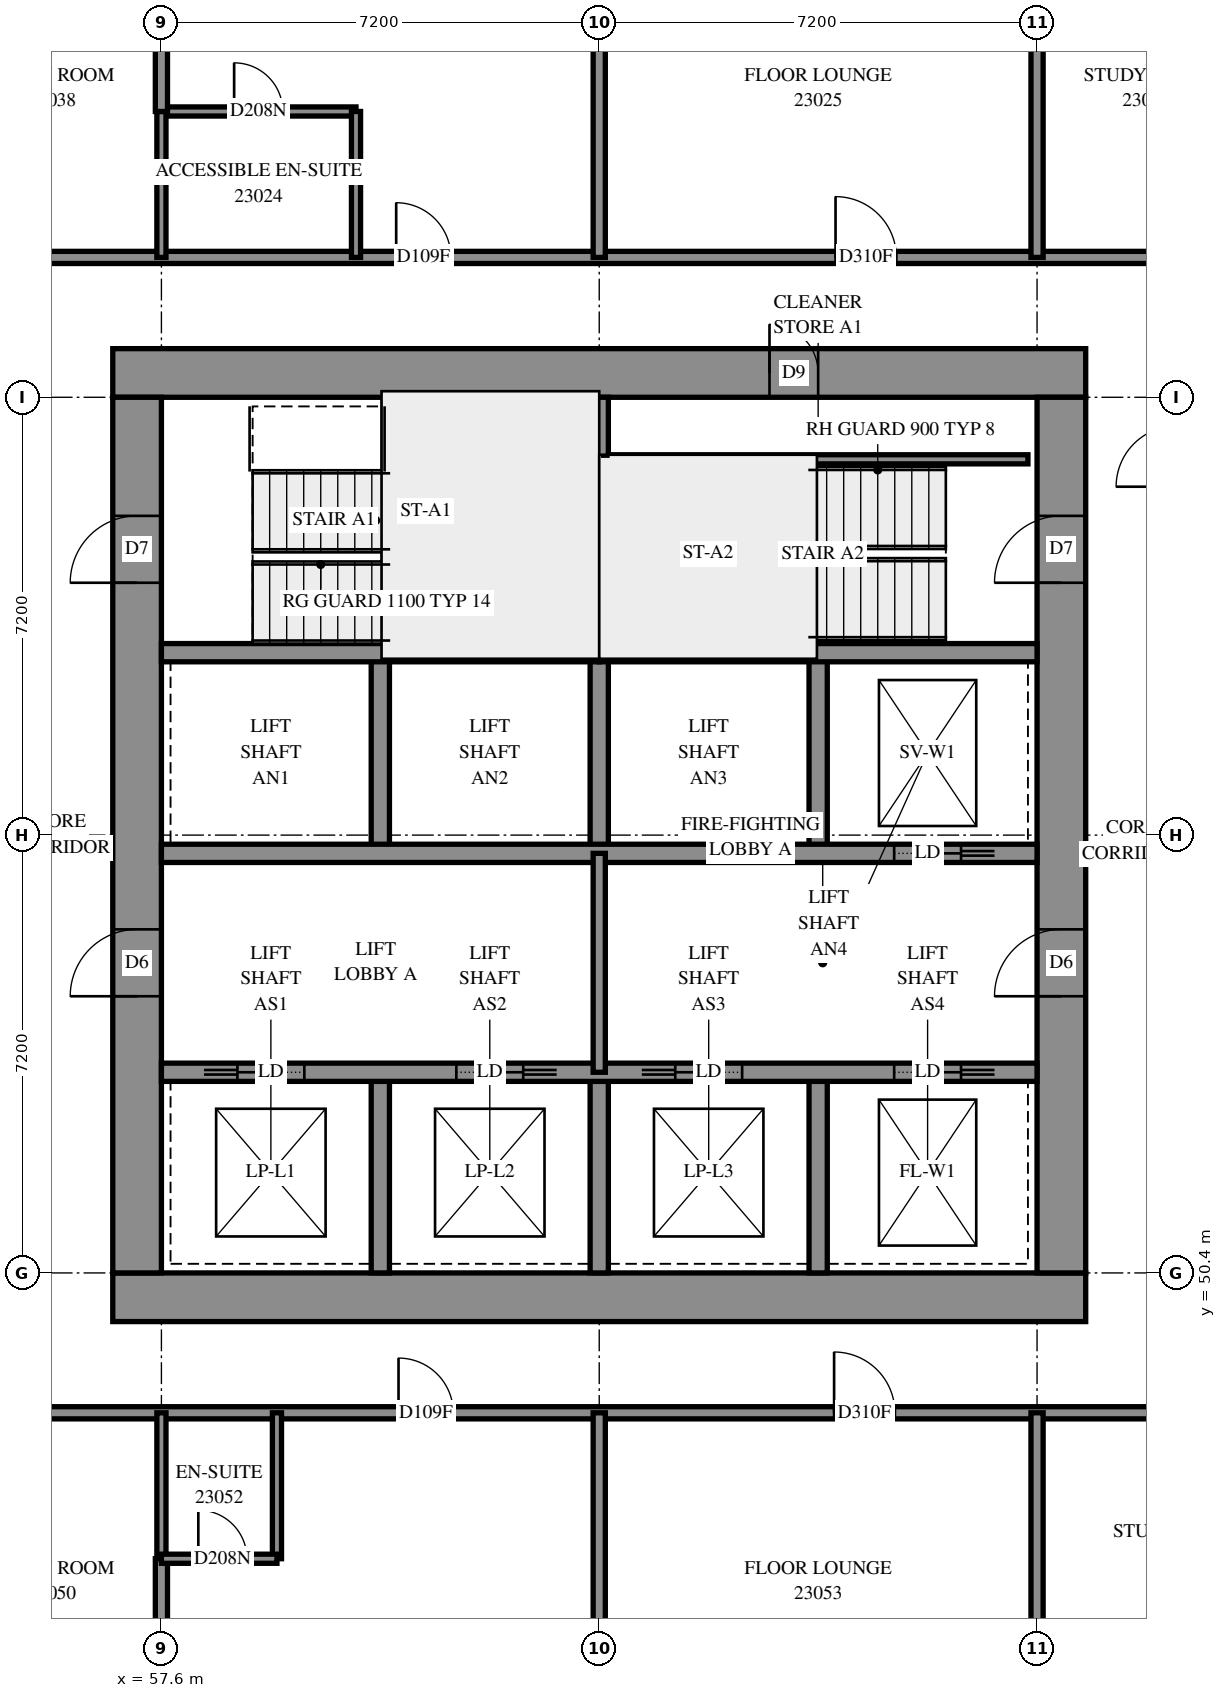
"""IFC4 building model, lengths in metres.
Left out: names, types, materials, properties, quantities, classifications, styles, units other than length and angle.
Written with IfcOpenShell. Run it as: python <this file> out.ifc"""

import sys

from ifc_helpers import new_model, si_unit, direction, frame, frame_2d, origin, place, context, subcontext, project, spatial, rectangle, extrude, element, fill, save


model = new_model("IFC4")
c1 = context("Model", 3, precision=1e-05, world=origin(), true_north=direction((0.0, 1.0)))
c2 = subcontext(c1, "Body", "Model", "MODEL_VIEW")
j1 = project(units=[si_unit("LENGTHUNIT", "METRE"), si_unit("PLANEANGLEUNIT", "RADIAN")], contexts=[c1])
p1 = place(None, origin())
s1 = spatial("IfcSite", under=j1, at=p1, CompositionType="ELEMENT")
p2 = place(p1, origin())
s2 = spatial("IfcBuilding", under=s1, at=p2, CompositionType="ELEMENT")
p3 = place(p2, frame((0.0, 0.0, 88.0)))
s3 = spatial("IfcBuildingStorey", under=s2, at=p3, CompositionType="ELEMENT", Elevation=88.0)
p4 = place(p3, frame((56.8, 50.0, -0.3), z_axis=(0.0, 0.0, 1.0), x_axis=(1.0, 0.0, 0.0)))
e1 = element("IfcWall", 1, at=p4, inside=s3, PredefinedType="SHEAR", context=c2, shape_type="SweptSolid", body=[
    extrude(rectangle(XDim=16.0, YDim=0.8, at=frame_2d((8.0, 0.0))), origin(), (0.0, 0.0, 1.0), 2.7),
])
p5 = place(p3, frame((56.8, 65.2, -0.3), z_axis=(0.0, 0.0, 1.0), x_axis=(1.0, 0.0, 0.0)))
e2 = element("IfcWall", 2, at=p5, inside=s3, PredefinedType="SHEAR", context=c2, shape_type="SweptSolid", body=[
    extrude(rectangle(XDim=16.0, YDim=0.8, at=frame_2d((8.0, 0.0))), origin(), (0.0, 0.0, 1.0), 2.7),
])
p6 = place(p5, frame((10.8, 0.0, 0.3)))
e3 = element("IfcOpeningElement", 3, at=p6, cuts=e2, PredefinedType="OPENING", context=c2, shape_type="SweptSolid", body=[
    extrude(rectangle(XDim=0.8, YDim=2.1, at=frame_2d((0.4, 1.05))), frame((0.0, 0.41, 0.0), z_axis=(0.0, -1.0, 0.0), x_axis=(1.0, 0.0, 0.0)), (0.0, 0.0, 1.0), 0.82),
])
p7 = place(p3, frame((57.2, 50.4, -0.3), z_axis=(0.0, 0.0, 1.0), x_axis=(0.0, 1.0, 0.0)))
e4 = element("IfcWall", 4, at=p7, inside=s3, PredefinedType="SHEAR", context=c2, shape_type="SweptSolid", body=[
    extrude(rectangle(XDim=14.4, YDim=0.8, at=frame_2d((7.2, 0.0))), origin(), (0.0, 0.0, 1.0), 2.7),
])
p8 = place(p7, frame((4.55, 0.0, 0.3)))
e5 = element("IfcOpeningElement", 5, at=p8, cuts=e4, PredefinedType="OPENING", context=c2, shape_type="SweptSolid", body=[
    extrude(rectangle(XDim=1.1, YDim=2.1, at=frame_2d((0.55, 1.05))), frame((0.0, 0.41, 0.0), z_axis=(0.0, -1.0, 0.0), x_axis=(1.0, 0.0, 0.0)), (0.0, 0.0, 1.0), 0.82),
])
p9 = place(p7, frame((11.35, 0.0, 0.3)))
e6 = element("IfcOpeningElement", 6, at=p9, cuts=e4, PredefinedType="OPENING", context=c2, shape_type="SweptSolid", body=[
    extrude(rectangle(XDim=1.1, YDim=2.1, at=frame_2d((0.55, 1.05))), frame((0.0, 0.41, 0.0), z_axis=(0.0, -1.0, 0.0), x_axis=(1.0, 0.0, 0.0)), (0.0, 0.0, 1.0), 0.82),
])
p10 = place(p3, frame((72.4, 50.4, -0.3), z_axis=(0.0, 0.0, 1.0), x_axis=(0.0, 1.0, 0.0)))
e7 = element("IfcWall", 7, at=p10, inside=s3, PredefinedType="SHEAR", context=c2, shape_type="SweptSolid", body=[
    extrude(rectangle(XDim=14.4, YDim=0.8, at=frame_2d((7.2, 0.0))), origin(), (0.0, 0.0, 1.0), 2.7),
])
p11 = place(p10, frame((4.55, 0.0, 0.3)))
e8 = element("IfcOpeningElement", 8, at=p11, cuts=e7, PredefinedType="OPENING", context=c2, shape_type="SweptSolid", body=[
    extrude(rectangle(XDim=1.1, YDim=2.1, at=frame_2d((0.55, 1.05))), frame((0.0, 0.41, 0.0), z_axis=(0.0, -1.0, 0.0), x_axis=(1.0, 0.0, 0.0)), (0.0, 0.0, 1.0), 0.82),
])
p12 = place(p10, frame((11.35, 0.0, 0.3)))
e9 = element("IfcOpeningElement", 9, at=p12, cuts=e7, PredefinedType="OPENING", context=c2, shape_type="SweptSolid", body=[
    extrude(rectangle(XDim=1.1, YDim=2.1, at=frame_2d((0.55, 1.05))), frame((0.0, 0.41, 0.0), z_axis=(0.0, -1.0, 0.0), x_axis=(1.0, 0.0, 0.0)), (0.0, 0.0, 1.0), 0.82),
])
for number, where, z_axis, x_axis in (
    (10, (61.2, 50.4, 0.0), (0.0, 0.0, 1.0), (0.0, 1.0, 0.0)),
    (11, (61.2, 57.3, 0.0), (0.0, 0.0, 1.0), (0.0, 1.0, 0.0)),
    (12, (64.8, 50.4, 0.0), (0.0, 0.0, 1.0), (0.0, 1.0, 0.0)),
    (13, (64.8, 57.3, 0.0), (0.0, 0.0, 1.0), (0.0, 1.0, 0.0)),
    (14, (68.4, 50.4, 0.0), (0.0, 0.0, 1.0), (0.0, 1.0, 0.0)),
    (15, (68.4, 57.3, 0.0), (0.0, 0.0, 1.0), (0.0, 1.0, 0.0)),
):
    element("IfcWall", number, at=place(p3, frame(where, z_axis=z_axis, x_axis=x_axis)), inside=s3, PredefinedType="SOLIDWALL", context=c2, shape_type="SweptSolid", body=[
        extrude(rectangle(XDim=3.3, YDim=0.3, at=frame_2d((1.65, 0.0))), origin(), (0.0, 0.0, 1.0), 3.1),
    ])
p13 = place(p3, frame((57.6, 53.7, 0.0), z_axis=(0.0, 0.0, 1.0), x_axis=(1.0, 0.0, 0.0)))
e16 = element("IfcWall", 16, at=p13, inside=s3, PredefinedType="SOLIDWALL", context=c2, shape_type="SweptSolid", body=[
    extrude(rectangle(XDim=14.4, YDim=0.3, at=frame_2d((7.2, 0.0))), origin(), (0.0, 0.0, 1.0), 3.1),
])
p14 = place(p13, frame((1.25, 0.0, 0.0)))
e17 = element("IfcOpeningElement", 17, at=p14, cuts=e16, PredefinedType="OPENING", context=c2, shape_type="SweptSolid", body=[
    extrude(rectangle(XDim=1.1, YDim=2.1, at=frame_2d((0.55, 1.05))), frame((0.0, 0.16, 0.0), z_axis=(0.0, -1.0, 0.0), x_axis=(1.0, 0.0, 0.0)), (0.0, 0.0, 1.0), 0.32),
])
p15 = place(p13, frame((4.85, 0.0, 0.0)))
e18 = element("IfcOpeningElement", 18, at=p15, cuts=e16, PredefinedType="OPENING", context=c2, shape_type="SweptSolid", body=[
    extrude(rectangle(XDim=1.1, YDim=2.1, at=frame_2d((0.55, 1.05))), frame((0.0, 0.16, 0.0), z_axis=(0.0, -1.0, 0.0), x_axis=(1.0, 0.0, 0.0)), (0.0, 0.0, 1.0), 0.32),
])
p16 = place(p13, frame((8.45, 0.0, 0.0)))
e19 = element("IfcOpeningElement", 19, at=p16, cuts=e16, PredefinedType="OPENING", context=c2, shape_type="SweptSolid", body=[
    extrude(rectangle(XDim=1.1, YDim=2.1, at=frame_2d((0.55, 1.05))), frame((0.0, 0.16, 0.0), z_axis=(0.0, -1.0, 0.0), x_axis=(1.0, 0.0, 0.0)), (0.0, 0.0, 1.0), 0.32),
])
p17 = place(p13, frame((12.05, 0.0, 0.0)))
e20 = element("IfcOpeningElement", 20, at=p17, cuts=e16, PredefinedType="OPENING", context=c2, shape_type="SweptSolid", body=[
    extrude(rectangle(XDim=1.1, YDim=2.1, at=frame_2d((0.55, 1.05))), frame((0.0, 0.16, 0.0), z_axis=(0.0, -1.0, 0.0), x_axis=(1.0, 0.0, 0.0)), (0.0, 0.0, 1.0), 0.32),
])
p18 = place(p3, frame((57.6, 57.3, 0.0), z_axis=(0.0, 0.0, 1.0), x_axis=(1.0, 0.0, 0.0)))
e21 = element("IfcWall", 21, at=p18, inside=s3, PredefinedType="SOLIDWALL", context=c2, shape_type="SweptSolid", body=[
    extrude(rectangle(XDim=14.4, YDim=0.3, at=frame_2d((7.2, 0.0))), origin(), (0.0, 0.0, 1.0), 3.1),
])
p19 = place(p18, frame((12.05, 0.0, 0.0)))
e22 = element("IfcOpeningElement", 22, at=p19, cuts=e21, PredefinedType="OPENING", context=c2, shape_type="SweptSolid", body=[
    extrude(rectangle(XDim=1.1, YDim=2.1, at=frame_2d((0.55, 1.05))), frame((0.0, 0.16, 0.0), z_axis=(0.0, -1.0, 0.0), x_axis=(1.0, 0.0, 0.0)), (0.0, 0.0, 1.0), 0.32),
])
for number, where, z_axis, x_axis in (
    (23, (57.6, 60.6, 0.0), (0.0, 0.0, 1.0), (1.0, 0.0, 0.0)),
    (24, (64.8, 60.6, 0.0), (0.0, 0.0, 1.0), (1.0, 0.0, 0.0)),
):
    element("IfcWall", number, at=place(p3, frame(where, z_axis=z_axis, x_axis=x_axis)), inside=s3, PredefinedType="SOLIDWALL", context=c2, shape_type="SweptSolid", body=[
        extrude(rectangle(XDim=7.2, YDim=0.3, at=frame_2d((3.6, 0.0))), origin(), (0.0, 0.0, 1.0), 3.1),
    ])
p20 = place(p3, frame((64.8, 60.6, 0.0), z_axis=(0.0, 0.0, 1.0), x_axis=(0.0, 1.0, 0.0)))
e25 = element("IfcWall", 25, at=p20, inside=s3, PredefinedType="SOLIDWALL", context=c2, shape_type="SweptSolid", body=[
    extrude(rectangle(XDim=4.2, YDim=0.3, at=frame_2d((2.1, 0.0))), origin(), (0.0, 0.0, 1.0), 3.1),
])
p21 = place(p3, frame((64.95, 63.78, 0.0), z_axis=(0.0, 0.0, 1.0), x_axis=(1.0, 0.0, 0.0)))
e26 = element("IfcWall", 26, at=p21, inside=s3, PredefinedType="PARTITIONING", context=c2, shape_type="SweptSolid", body=[
    extrude(rectangle(XDim=6.9, YDim=0.15, at=frame_2d((3.45, 0.0))), origin(), (0.0, 0.0, 1.0), 3.1),
])
p22 = place(p3, frame((64.8, 53.7, 0.0), z_axis=(0.0, 0.0, 1.0), x_axis=(0.0, 1.0, 0.0)))
e27 = element("IfcWall", 27, at=p22, inside=s3, PredefinedType="PARTITIONING", context=c2, shape_type="SweptSolid", body=[
    extrude(rectangle(XDim=3.6, YDim=0.2, at=frame_2d((1.8, 0.0))), origin(), (0.0, 0.0, 1.0), 3.1),
])
p23 = place(p3, frame((55.3, 48.1, 0.0), z_axis=(0.0, 0.0, 1.0), x_axis=(1.0, 0.0, 0.0)))
e28 = element("IfcWall", 28, at=p23, inside=s3, PredefinedType="PARTITIONING", context=c2, shape_type="SweptSolid", body=[
    extrude(rectangle(XDim=19.092, YDim=0.2, at=frame_2d((9.546, 0.0))), origin(), (0.0, 0.0, 1.0), 3.1),
])
p24 = place(p23, frame((6.199, 0.0, 0.0)))
e29 = element("IfcOpeningElement", 29, at=p24, cuts=e28, PredefinedType="OPENING", context=c2, shape_type="SweptSolid", body=[
    extrude(rectangle(XDim=0.9, YDim=2.1, at=frame_2d((0.45, 1.05))), frame((0.0, 0.11, 0.0), z_axis=(0.0, -1.0, 0.0), x_axis=(1.0, 0.0, 0.0)), (0.0, 0.0, 1.0), 0.22),
])
p25 = place(p23, frame((13.363, 0.0, 0.0)))
e30 = element("IfcOpeningElement", 30, at=p25, cuts=e28, PredefinedType="OPENING", context=c2, shape_type="SweptSolid", body=[
    extrude(rectangle(XDim=1.0, YDim=2.1, at=frame_2d((0.5, 1.05))), frame((0.0, 0.11, 0.0), z_axis=(0.0, -1.0, 0.0), x_axis=(1.0, 0.0, 0.0)), (0.0, 0.0, 1.0), 0.22),
])
p26 = place(p3, frame((55.3, 67.1, 0.0), z_axis=(0.0, 0.0, 1.0), x_axis=(1.0, 0.0, 0.0)))
e31 = element("IfcWall", 31, at=p26, inside=s3, PredefinedType="PARTITIONING", context=c2, shape_type="SweptSolid", body=[
    extrude(rectangle(XDim=19.0, YDim=0.2, at=frame_2d((9.5, 0.0))), origin(), (0.0, 0.0, 1.0), 3.1),
])
p27 = place(p26, frame((6.161, 0.0, 0.0)))
e32 = element("IfcOpeningElement", 32, at=p27, cuts=e31, PredefinedType="OPENING", context=c2, shape_type="SweptSolid", body=[
    extrude(rectangle(XDim=0.9, YDim=2.1, at=frame_2d((0.45, 1.05))), frame((0.0, 0.11, 0.0), z_axis=(0.0, -1.0, 0.0), x_axis=(1.0, 0.0, 0.0)), (0.0, 0.0, 1.0), 0.22),
])
p28 = place(p26, frame((13.386, 0.0, 0.0)))
e33 = element("IfcOpeningElement", 33, at=p28, cuts=e31, PredefinedType="OPENING", context=c2, shape_type="SweptSolid", body=[
    extrude(rectangle(XDim=1.0, YDim=2.1, at=frame_2d((0.5, 1.05))), frame((0.0, 0.11, 0.0), z_axis=(0.0, -1.0, 0.0), x_axis=(1.0, 0.0, 0.0)), (0.0, 0.0, 1.0), 0.22),
])
for number, where, z_axis, x_axis in (
    (34, (64.8, 67.1, 0.0), (0.0, 0.0, 1.0), (0.0, 1.0, 0.0)),
    (35, (72.0, 67.1, 0.0), (0.0, 0.0, 1.0), (0.0, 1.0, 0.0)),
    (36, (64.8, 43.7, 0.0), (0.0, 0.0, 1.0), (0.0, 1.0, 0.0)),
    (37, (72.0, 43.7, 0.0), (0.0, 0.0, 1.0), (0.0, 1.0, 0.0)),
):
    element("IfcWall", number, at=place(p3, frame(where, z_axis=z_axis, x_axis=x_axis)), inside=s3, PredefinedType="PARTITIONING", context=c2, shape_type="SweptSolid", body=[
        extrude(rectangle(XDim=4.4, YDim=0.2, at=frame_2d((2.2, 0.0))), origin(), (0.0, 0.0, 1.0), 3.1),
    ])
p29 = place(p3, frame((57.6, 69.5, 0.0), z_axis=(0.0, 0.0, 1.0), x_axis=(1.0, 0.0, 0.0)))
e38 = element("IfcWall", 38, at=p29, inside=s3, PredefinedType="PARTITIONING", context=c2, shape_type="SweptSolid", body=[
    extrude(rectangle(XDim=3.2, YDim=0.15, at=frame_2d((1.6, 0.0))), origin(), (0.0, 0.0, 1.0), 3.1),
])
p30 = place(p29, frame((1.196, 0.0, 0.0)))
e39 = element("IfcOpeningElement", 39, at=p30, cuts=e38, PredefinedType="OPENING", context=c2, shape_type="SweptSolid", body=[
    extrude(rectangle(XDim=0.8, YDim=2.1, at=frame_2d((0.4, 1.05))), frame((0.0, 0.085, 0.0), z_axis=(0.0, -1.0, 0.0), x_axis=(1.0, 0.0, 0.0)), (0.0, 0.0, 1.0), 0.17),
])
for number, where, z_axis, x_axis in (
    (40, (57.6, 67.1, 0.0), (0.0, 0.0, 1.0), (0.0, 1.0, 0.0)),
    (41, (60.8, 67.1, 0.0), (0.0, 0.0, 1.0), (0.0, 1.0, 0.0)),
    (42, (59.5, 45.7, 0.0), (0.0, 0.0, 1.0), (0.0, 1.0, 0.0)),
    (43, (57.6, 45.7, 0.0), (0.0, 0.0, 1.0), (0.0, 1.0, 0.0)),
):
    element("IfcWall", number, at=place(p3, frame(where, z_axis=z_axis, x_axis=x_axis)), inside=s3, PredefinedType="PARTITIONING", context=c2, shape_type="SweptSolid", body=[
        extrude(rectangle(XDim=2.4, YDim=0.15, at=frame_2d((1.2, 0.0))), origin(), (0.0, 0.0, 1.0), 3.1),
    ])
for number, where, z_axis, x_axis in (
    (44, (57.6, 43.7, 0.0), (0.0, 0.0, 1.0), (0.0, 1.0, 0.0)),
    (45, (57.6, 69.5, 0.0), (0.0, 0.0, 1.0), (0.0, 1.0, 0.0)),
):
    element("IfcWall", number, at=place(p3, frame(where, z_axis=z_axis, x_axis=x_axis)), inside=s3, PredefinedType="PARTITIONING", context=c2, shape_type="SweptSolid", body=[
        extrude(rectangle(XDim=2.0, YDim=0.2, at=frame_2d((1.0, 0.0))), origin(), (0.0, 0.0, 1.0), 3.1),
    ])
p31 = place(p3, frame((57.6, 45.7, 0.0), z_axis=(0.0, 0.0, 1.0), x_axis=(1.0, 0.0, 0.0)))
e46 = element("IfcWall", 46, at=p31, inside=s3, PredefinedType="PARTITIONING", context=c2, shape_type="SweptSolid", body=[
    extrude(rectangle(XDim=1.9, YDim=0.15, at=frame_2d((0.95, 0.0))), origin(), (0.0, 0.0, 1.0), 3.1),
])
p32 = place(p31, frame((0.607, 0.0, 0.0)))
e47 = element("IfcOpeningElement", 47, at=p32, cuts=e46, PredefinedType="OPENING", context=c2, shape_type="SweptSolid", body=[
    extrude(rectangle(XDim=0.8, YDim=2.1, at=frame_2d((0.4, 1.05))), frame((0.0, 0.085, 0.0), z_axis=(0.0, -1.0, 0.0), x_axis=(1.0, 0.0, 0.0)), (0.0, 0.0, 1.0), 0.17),
])
p33 = place(p6, origin())
e48 = element("IfcDoor", 48, at=p33, inside=s3, OperationType="SINGLE_SWING_RIGHT", PredefinedType="DOOR", context=c2, shape_type="SweptSolid", body=[
    extrude(rectangle(XDim=0.8, YDim=2.1, at=frame_2d((0.4, 1.05))), frame((0.0, -0.34, 0.0), z_axis=(0.0, -1.0, 0.0), x_axis=(1.0, 0.0, 0.0)), (0.0, 0.0, 1.0), 0.05),
])
fill(e3, e48)
p34 = place(p8, origin())
e49 = element("IfcDoor", 49, at=p34, inside=s3, OperationType="DOUBLE_DOOR_SINGLE_SWING", PredefinedType="DOOR", context=c2, shape_type="SweptSolid", body=[
    extrude(rectangle(XDim=1.1, YDim=2.1, at=frame_2d((0.55, 1.05))), frame((0.0, 0.025, 0.0), z_axis=(0.0, -1.0, 0.0), x_axis=(1.0, 0.0, 0.0)), (0.0, 0.0, 1.0), 0.05),
])
fill(e5, e49)
p35 = place(p11, origin())
e50 = element("IfcDoor", 50, at=p35, inside=s3, OperationType="DOUBLE_DOOR_SINGLE_SWING", PredefinedType="DOOR", context=c2, shape_type="SweptSolid", body=[
    extrude(rectangle(XDim=1.1, YDim=2.1, at=frame_2d((0.55, 1.05))), frame((0.0, 0.025, 0.0), z_axis=(0.0, -1.0, 0.0), x_axis=(1.0, 0.0, 0.0)), (0.0, 0.0, 1.0), 0.05),
])
fill(e8, e50)
p36 = place(p9, origin())
e51 = element("IfcDoor", 51, at=p36, inside=s3, OperationType="SINGLE_SWING_LEFT", PredefinedType="DOOR", context=c2, shape_type="SweptSolid", body=[
    extrude(rectangle(XDim=1.1, YDim=2.1, at=frame_2d((0.55, 1.05))), frame((0.0, 0.025, 0.0), z_axis=(0.0, -1.0, 0.0), x_axis=(1.0, 0.0, 0.0)), (0.0, 0.0, 1.0), 0.05),
])
fill(e6, e51)
p37 = place(p12, origin())
e52 = element("IfcDoor", 52, at=p37, inside=s3, OperationType="SINGLE_SWING_RIGHT", PredefinedType="DOOR", context=c2, shape_type="SweptSolid", body=[
    extrude(rectangle(XDim=1.1, YDim=2.1, at=frame_2d((0.55, 1.05))), frame((0.0, 0.025, 0.0), z_axis=(0.0, -1.0, 0.0), x_axis=(1.0, 0.0, 0.0)), (0.0, 0.0, 1.0), 0.05),
])
fill(e9, e52)
p38 = place(p14, origin())
e53 = element("IfcDoor", 53, at=p38, inside=s3, OperationType="SLIDING_TO_LEFT", PredefinedType="DOOR", context=c2, shape_type="SweptSolid", body=[
    extrude(rectangle(XDim=1.1, YDim=2.1, at=frame_2d((0.55, 1.05))), frame((0.0, 0.025, 0.0), z_axis=(0.0, -1.0, 0.0), x_axis=(1.0, 0.0, 0.0)), (0.0, 0.0, 1.0), 0.05),
])
fill(e17, e53)
p39 = place(p15, origin())
e54 = element("IfcDoor", 54, at=p39, inside=s3, OperationType="SLIDING_TO_RIGHT", PredefinedType="DOOR", context=c2, shape_type="SweptSolid", body=[
    extrude(rectangle(XDim=1.1, YDim=2.1, at=frame_2d((0.55, 1.05))), frame((0.0, 0.025, 0.0), z_axis=(0.0, -1.0, 0.0), x_axis=(1.0, 0.0, 0.0)), (0.0, 0.0, 1.0), 0.05),
])
fill(e18, e54)
p40 = place(p16, origin())
e55 = element("IfcDoor", 55, at=p40, inside=s3, OperationType="SLIDING_TO_LEFT", PredefinedType="DOOR", context=c2, shape_type="SweptSolid", body=[
    extrude(rectangle(XDim=1.1, YDim=2.1, at=frame_2d((0.55, 1.05))), frame((0.0, 0.025, 0.0), z_axis=(0.0, -1.0, 0.0), x_axis=(1.0, 0.0, 0.0)), (0.0, 0.0, 1.0), 0.05),
])
fill(e19, e55)
p41 = place(p17, origin())
e56 = element("IfcDoor", 56, at=p41, inside=s3, OperationType="SLIDING_TO_RIGHT", PredefinedType="DOOR", context=c2, shape_type="SweptSolid", body=[
    extrude(rectangle(XDim=1.1, YDim=2.1, at=frame_2d((0.55, 1.05))), frame((0.0, 0.025, 0.0), z_axis=(0.0, -1.0, 0.0), x_axis=(1.0, 0.0, 0.0)), (0.0, 0.0, 1.0), 0.05),
])
fill(e20, e56)
p42 = place(p19, origin())
e57 = element("IfcDoor", 57, at=p42, inside=s3, OperationType="SLIDING_TO_RIGHT", PredefinedType="DOOR", context=c2, shape_type="SweptSolid", body=[
    extrude(rectangle(XDim=1.1, YDim=2.1, at=frame_2d((0.55, 1.05))), frame((0.0, 0.025, 0.0), z_axis=(0.0, -1.0, 0.0), x_axis=(1.0, 0.0, 0.0)), (0.0, 0.0, 1.0), 0.05),
])
fill(e22, e57)
p43 = place(p27, origin())
e58 = element("IfcDoor", 58, at=p43, inside=s3, OperationType="SINGLE_SWING_RIGHT", PredefinedType="DOOR", context=c2, shape_type="SweptSolid", body=[
    extrude(rectangle(XDim=0.9, YDim=2.1, at=frame_2d((0.45, 1.05))), frame((0.0, 0.025, 0.0), z_axis=(0.0, -1.0, 0.0), x_axis=(1.0, 0.0, 0.0)), (0.0, 0.0, 1.0), 0.05),
])
fill(e32, e58)
p44 = place(p30, origin())
e59 = element("IfcDoor", 59, at=p44, inside=s3, OperationType="SINGLE_SWING_RIGHT", PredefinedType="DOOR", context=c2, shape_type="SweptSolid", body=[
    extrude(rectangle(XDim=0.8, YDim=2.1, at=frame_2d((0.4, 1.05))), frame((0.0, 0.025, 0.0), z_axis=(0.0, -1.0, 0.0), x_axis=(1.0, 0.0, 0.0)), (0.0, 0.0, 1.0), 0.05),
])
fill(e39, e59)
p45 = place(p28, origin())
e60 = element("IfcDoor", 60, at=p45, inside=s3, OperationType="SINGLE_SWING_RIGHT", PredefinedType="DOOR", context=c2, shape_type="SweptSolid", body=[
    extrude(rectangle(XDim=1.0, YDim=2.1, at=frame_2d((0.5, 1.05))), frame((0.0, 0.025, 0.0), z_axis=(0.0, -1.0, 0.0), x_axis=(1.0, 0.0, 0.0)), (0.0, 0.0, 1.0), 0.05),
])
fill(e33, e60)
p46 = place(p24, origin())
e61 = element("IfcDoor", 61, at=p46, inside=s3, OperationType="SINGLE_SWING_LEFT", PredefinedType="DOOR", context=c2, shape_type="SweptSolid", body=[
    extrude(rectangle(XDim=0.9, YDim=2.1, at=frame_2d((0.45, 1.05))), frame((0.0, 0.025, 0.0), z_axis=(0.0, -1.0, 0.0), x_axis=(1.0, 0.0, 0.0)), (0.0, 0.0, 1.0), 0.05),
])
fill(e29, e61)
p47 = place(p32, origin())
e62 = element("IfcDoor", 62, at=p47, inside=s3, OperationType="SINGLE_SWING_RIGHT", PredefinedType="DOOR", context=c2, shape_type="SweptSolid", body=[
    extrude(rectangle(XDim=0.8, YDim=2.1, at=frame_2d((0.4, 1.05))), frame((0.0, 0.025, 0.0), z_axis=(0.0, -1.0, 0.0), x_axis=(1.0, 0.0, 0.0)), (0.0, 0.0, 1.0), 0.05),
])
fill(e47, e62)
p48 = place(p25, origin())
e63 = element("IfcDoor", 63, at=p48, inside=s3, OperationType="SINGLE_SWING_LEFT", PredefinedType="DOOR", context=c2, shape_type="SweptSolid", body=[
    extrude(rectangle(XDim=1.0, YDim=2.1, at=frame_2d((0.5, 1.05))), frame((0.0, 0.025, 0.0), z_axis=(0.0, -1.0, 0.0), x_axis=(1.0, 0.0, 0.0)), (0.0, 0.0, 1.0), 0.05),
])
fill(e30, e63)
save(model, sys.argv[1])
